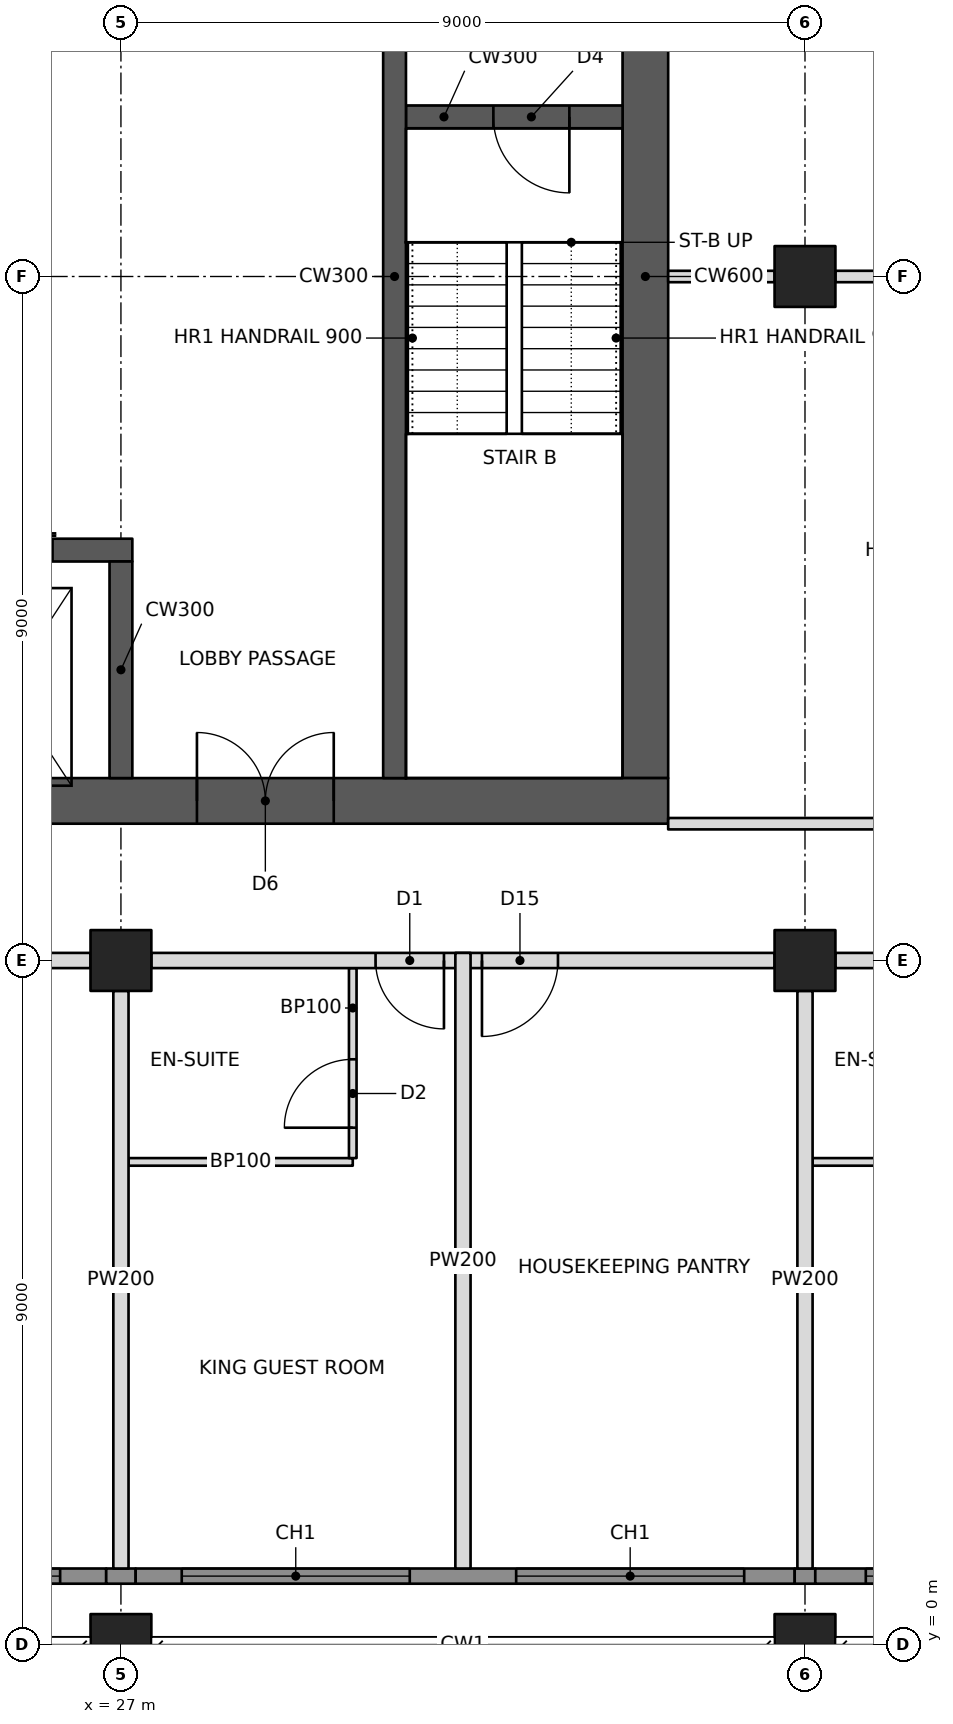
"""IFC4 building model, lengths in metres.
Left out: names, types, materials, properties, quantities, classifications, styles, units other than length and angle.
Written with IfcOpenShell. Run it as: python <this file> out.ifc"""

import sys

from ifc_helpers import new_model, si_unit, direction, frame, frame_2d, origin, origin_2d, place, context, subcontext, project, spatial, rectangle, hollow_rectangle, extrude, element, fill, save


model = new_model("IFC4")
c1 = context("Model", 3, precision=1e-05, world=origin(), true_north=direction((0.0, 1.0)))
c2 = subcontext(c1, "Body", "Model", "MODEL_VIEW")
j1 = project(units=[si_unit("LENGTHUNIT", "METRE"), si_unit("PLANEANGLEUNIT", "RADIAN")], contexts=[c1])
p1 = place(None, origin())
s1 = spatial("IfcSite", under=j1, at=p1, CompositionType="ELEMENT")
p2 = place(p1, origin())
s2 = spatial("IfcBuilding", under=s1, at=p2, CompositionType="ELEMENT")
p3 = place(p2, frame((0.0, 0.0, 28.0)))
s3 = spatial("IfcBuildingStorey", under=s2, at=p3, CompositionType="ELEMENT", Elevation=28.0)
for number, where, z_axis, x_axis in (
    (1, (27.0, 0.0, 0.0), (0.0, 0.0, 1.0), (1.0, 0.0, 0.0)),
    (2, (27.0, 9.0, 0.0), (0.0, 0.0, 1.0), (1.0, 0.0, 0.0)),
    (3, (36.0, 0.0, 0.0), (0.0, 0.0, 1.0), (1.0, 0.0, 0.0)),
    (4, (36.0, 9.0, 0.0), (0.0, 0.0, 1.0), (0.0, 1.0, 0.0)),
    (5, (36.0, 18.0, 0.0), (0.0, 0.0, 1.0), (0.0, 1.0, 0.0)),
):
    element("IfcColumn", number, at=place(p3, frame(where, z_axis=z_axis, x_axis=x_axis)), inside=s3, PredefinedType="COLUMN", context=c2, shape_type="SweptSolid", body=[
        extrude(hollow_rectangle(XDim=0.8, YDim=0.8, WallThickness=0.1, at=origin_2d()), origin(), (0.0, 0.0, 1.0), 3.4),
    ])
p4 = place(p3, frame((10.8, 11.1, 0.0), z_axis=(0.0, 0.0, 1.0), x_axis=(1.0, 0.0, 0.0)))
e6 = element("IfcWall", 6, at=p4, inside=s3, PredefinedType="SHEAR", context=c2, shape_type="SweptSolid", body=[
    extrude(rectangle(XDim=23.4, YDim=0.6, at=frame_2d((11.7, 0.0))), origin(), (0.0, 0.0, 1.0), 3.4),
])
p5 = place(p4, frame((1.0, 0.0, 0.0)))
e7 = element("IfcOpeningElement", 7, at=p5, cuts=e6, PredefinedType="OPENING", context=c2, shape_type="SweptSolid", body=[
    extrude(rectangle(XDim=1.0, YDim=2.1, at=frame_2d((0.5, 1.05))), frame((0.0, 0.31, 0.0), z_axis=(0.0, -1.0, 0.0), x_axis=(1.0, 0.0, 0.0)), (0.0, 0.0, 1.0), 0.62),
])
p6 = place(p4, frame((17.2, 0.0, 0.0)))
e8 = element("IfcOpeningElement", 8, at=p6, cuts=e6, PredefinedType="OPENING", context=c2, shape_type="SweptSolid", body=[
    extrude(rectangle(XDim=1.8, YDim=2.1, at=frame_2d((0.9, 1.05))), frame((0.0, 0.31, 0.0), z_axis=(0.0, -1.0, 0.0), x_axis=(1.0, 0.0, 0.0)), (0.0, 0.0, 1.0), 0.62),
])
p7 = place(p3, frame((33.9, 11.4, 0.0), z_axis=(0.0, 0.0, 1.0), x_axis=(0.0, 1.0, 0.0)))
e9 = element("IfcWall", 9, at=p7, inside=s3, PredefinedType="SHEAR", context=c2, shape_type="SweptSolid", body=[
    extrude(rectangle(XDim=13.2, YDim=0.6, at=frame_2d((6.6, 0.0))), origin(), (0.0, 0.0, 1.0), 3.4),
])
p8 = place(p3, frame((18.15, 14.4, 0.0), z_axis=(0.0, 0.0, 1.0), x_axis=(1.0, 0.0, 0.0)))
e10 = element("IfcWall", 10, at=p8, inside=s3, PredefinedType="SHEAR", context=c2, shape_type="SweptSolid", body=[
    extrude(rectangle(XDim=9.0, YDim=0.3, at=frame_2d((4.5, 0.0))), origin(), (0.0, 0.0, 1.0), 3.4),
])
p9 = place(p8, frame((0.8, 0.0, 0.0)))
e11 = element("IfcOpeningElement", 11, at=p9, cuts=e10, PredefinedType="OPENING", context=c2, shape_type="SweptSolid", body=[
    extrude(rectangle(XDim=1.1, YDim=2.1, at=frame_2d((0.55, 1.05))), frame((0.0, 0.16, 0.0), z_axis=(0.0, -1.0, 0.0), x_axis=(1.0, 0.0, 0.0)), (0.0, 0.0, 1.0), 0.32),
])
p10 = place(p8, frame((3.8, 0.0, 0.0)))
e12 = element("IfcOpeningElement", 12, at=p10, cuts=e10, PredefinedType="OPENING", context=c2, shape_type="SweptSolid", body=[
    extrude(rectangle(XDim=1.1, YDim=2.1, at=frame_2d((0.55, 1.05))), frame((0.0, 0.16, 0.0), z_axis=(0.0, -1.0, 0.0), x_axis=(1.0, 0.0, 0.0)), (0.0, 0.0, 1.0), 0.32),
])
p11 = place(p8, frame((6.75, 0.0, 0.0)))
e13 = element("IfcOpeningElement", 13, at=p11, cuts=e10, PredefinedType="OPENING", context=c2, shape_type="SweptSolid", body=[
    extrude(rectangle(XDim=1.2, YDim=2.1, at=frame_2d((0.6, 1.05))), frame((0.0, 0.16, 0.0), z_axis=(0.0, -1.0, 0.0), x_axis=(1.0, 0.0, 0.0)), (0.0, 0.0, 1.0), 0.32),
])
p12 = place(p3, frame((27.0, 11.4, 0.0), z_axis=(0.0, 0.0, 1.0), x_axis=(0.0, 1.0, 0.0)))
e14 = element("IfcWall", 14, at=p12, inside=s3, PredefinedType="SHEAR", context=c2, shape_type="SweptSolid", body=[
    extrude(rectangle(XDim=2.85, YDim=0.3, at=frame_2d((1.425, 0.0))), origin(), (0.0, 0.0, 1.0), 3.4),
])
p13 = place(p3, frame((30.6, 11.4, 0.0), z_axis=(0.0, 0.0, 1.0), x_axis=(0.0, 1.0, 0.0)))
e15 = element("IfcWall", 15, at=p13, inside=s3, PredefinedType="SHEAR", context=c2, shape_type="SweptSolid", body=[
    extrude(rectangle(XDim=13.2, YDim=0.3, at=frame_2d((6.6, 0.0))), origin(), (0.0, 0.0, 1.0), 3.4),
])
p14 = place(p3, frame((30.75, 20.1, 0.0), z_axis=(0.0, 0.0, 1.0), x_axis=(1.0, 0.0, 0.0)))
e16 = element("IfcWall", 16, at=p14, inside=s3, PredefinedType="SHEAR", context=c2, shape_type="SweptSolid", body=[
    extrude(rectangle(XDim=2.85, YDim=0.3, at=frame_2d((1.425, 0.0))), origin(), (0.0, 0.0, 1.0), 3.4),
])
p15 = place(p14, frame((1.15, 0.0, 0.0)))
e17 = element("IfcOpeningElement", 17, at=p15, cuts=e16, PredefinedType="OPENING", context=c2, shape_type="SweptSolid", body=[
    extrude(rectangle(XDim=1.0, YDim=2.1, at=frame_2d((0.5, 1.05))), frame((0.0, 0.16, 0.0), z_axis=(0.0, -1.0, 0.0), x_axis=(1.0, 0.0, 0.0)), (0.0, 0.0, 1.0), 0.32),
])
p16 = place(p3, frame((27.4, 9.0, 0.0), z_axis=(0.0, 0.0, 1.0), x_axis=(1.0, 0.0, 0.0)))
e18 = element("IfcWall", 18, at=p16, inside=s3, PredefinedType="PARTITIONING", context=c2, shape_type="SweptSolid", body=[
    extrude(rectangle(XDim=8.2, YDim=0.2, at=frame_2d((4.1, 0.0))), origin(), (0.0, 0.0, 1.0), 2.405),
])
p17 = place(p16, frame((2.95, 0.0, 0.0)))
e19 = element("IfcOpeningElement", 19, at=p17, cuts=e18, PredefinedType="OPENING", context=c2, shape_type="SweptSolid", body=[
    extrude(rectangle(XDim=0.9, YDim=2.1, at=frame_2d((0.45, 1.05))), frame((0.0, 0.11, 0.0), z_axis=(0.0, -1.0, 0.0), x_axis=(1.0, 0.0, 0.0)), (0.0, 0.0, 1.0), 0.22),
])
p18 = place(p16, frame((4.35, 0.0, 0.0)))
e20 = element("IfcOpeningElement", 20, at=p18, cuts=e18, PredefinedType="OPENING", context=c2, shape_type="SweptSolid", body=[
    extrude(rectangle(XDim=1.0, YDim=2.1, at=frame_2d((0.5, 1.05))), frame((0.0, 0.11, 0.0), z_axis=(0.0, -1.0, 0.0), x_axis=(1.0, 0.0, 0.0)), (0.0, 0.0, 1.0), 0.22),
])
p19 = place(p3, frame((36.4, 9.0, 0.0), z_axis=(0.0, 0.0, 1.0), x_axis=(1.0, 0.0, 0.0)))
e21 = element("IfcWall", 21, at=p19, inside=s3, PredefinedType="PARTITIONING", context=c2, shape_type="SweptSolid", body=[
    extrude(rectangle(XDim=8.2, YDim=0.2, at=frame_2d((4.1, 0.0))), origin(), (0.0, 0.0, 1.0), 2.438),
])
p20 = place(p19, frame((2.95, 0.0, 0.0)))
e22 = element("IfcOpeningElement", 22, at=p20, cuts=e21, PredefinedType="OPENING", context=c2, shape_type="SweptSolid", body=[
    extrude(rectangle(XDim=0.9, YDim=2.1, at=frame_2d((0.45, 1.05))), frame((0.0, 0.11, 0.0), z_axis=(0.0, -1.0, 0.0), x_axis=(1.0, 0.0, 0.0)), (0.0, 0.0, 1.0), 0.22),
])
p21 = place(p19, frame((4.35, 0.0, 0.0)))
e23 = element("IfcOpeningElement", 23, at=p21, cuts=e21, PredefinedType="OPENING", context=c2, shape_type="SweptSolid", body=[
    extrude(rectangle(XDim=0.9, YDim=2.1, at=frame_2d((0.45, 1.05))), frame((0.0, 0.11, 0.0), z_axis=(0.0, -1.0, 0.0), x_axis=(1.0, 0.0, 0.0)), (0.0, 0.0, 1.0), 0.22),
])
p22 = place(p3, frame((34.2, 10.8, 0.0), z_axis=(0.0, 0.0, 1.0), x_axis=(1.0, 0.0, 0.0)))
e24 = element("IfcWall", 24, at=p22, inside=s3, PredefinedType="PARTITIONING", context=c2, shape_type="SweptSolid", body=[
    extrude(rectangle(XDim=9.075, YDim=0.15, at=frame_2d((4.538, 0.0))), origin(), (0.0, 0.0, 1.0), 2.404),
])
p23 = place(p22, frame((3.0, 0.0, 0.0)))
e25 = element("IfcOpeningElement", 25, at=p23, cuts=e24, PredefinedType="OPENING", context=c2, shape_type="SweptSolid", body=[
    extrude(rectangle(XDim=1.0, YDim=2.1, at=frame_2d((0.5, 1.05))), frame((0.0, 0.085, 0.0), z_axis=(0.0, -1.0, 0.0), x_axis=(1.0, 0.0, 0.0)), (0.0, 0.0, 1.0), 0.17),
])
p24 = place(p3, frame((34.2, 18.0, 0.0), z_axis=(0.0, 0.0, 1.0), x_axis=(1.0, 0.0, 0.0)))
e26 = element("IfcWall", 26, at=p24, inside=s3, PredefinedType="PARTITIONING", context=c2, shape_type="SweptSolid", body=[
    extrude(rectangle(XDim=1.4, YDim=0.15, at=frame_2d((0.7, 0.0))), origin(), (0.0, 0.0, 1.0), 3.2),
])
p25 = place(p3, frame((36.4, 18.0, 0.0), z_axis=(0.0, 0.0, 1.0), x_axis=(1.0, 0.0, 0.0)))
e27 = element("IfcWall", 27, at=p25, inside=s3, PredefinedType="PARTITIONING", context=c2, shape_type="SweptSolid", body=[
    extrude(rectangle(XDim=6.725, YDim=0.15, at=frame_2d((3.363, 0.0))), origin(), (0.0, 0.0, 1.0), 2.405),
])
p26 = place(p3, frame((27.0, 8.6, 0.0), z_axis=(0.0, 0.0, 1.0), x_axis=(0.0, -1.0, 0.0)))
e28 = element("IfcWall", 28, at=p26, inside=s3, PredefinedType="PARTITIONING", context=c2, shape_type="SweptSolid", body=[
    extrude(rectangle(XDim=7.6, YDim=0.2, at=frame_2d((3.8, 0.0))), origin(), (0.0, 0.0, 1.0), 2.405),
])
p27 = place(p3, frame((36.0, 8.6, 0.0), z_axis=(0.0, 0.0, 1.0), x_axis=(0.0, -1.0, 0.0)))
e29 = element("IfcWall", 29, at=p27, inside=s3, PredefinedType="PARTITIONING", context=c2, shape_type="SweptSolid", body=[
    extrude(rectangle(XDim=7.6, YDim=0.2, at=frame_2d((3.8, 0.0))), origin(), (0.0, 0.0, 1.0), 2.438),
])
p28 = place(p3, frame((20.1, 9.0, 0.0), z_axis=(0.0, 0.0, 1.0), x_axis=(1.0, 0.0, 0.0)))
e30 = element("IfcWall", 30, at=p28, inside=s3, PredefinedType="PARTITIONING", context=c2, shape_type="SweptSolid", body=[
    extrude(rectangle(XDim=6.5, YDim=0.2, at=frame_2d((3.25, 0.0))), origin(), (0.0, 0.0, 1.0), 2.405),
])
p29 = place(p3, frame((31.5, 9.1, 0.0), z_axis=(0.0, 0.0, 1.0), x_axis=(0.0, -1.0, 0.0)))
e31 = element("IfcWall", 31, at=p29, inside=s3, PredefinedType="PARTITIONING", context=c2, shape_type="SweptSolid", body=[
    extrude(rectangle(XDim=8.1, YDim=0.2, at=frame_2d((4.05, 0.0))), origin(), (0.0, 0.0, 1.0), 2.404),
])
p30 = place(p3, frame((27.1, 6.35, 0.0), z_axis=(0.0, 0.0, 1.0), x_axis=(1.0, 0.0, 0.0)))
e32 = element("IfcWall", 32, at=p30, inside=s3, PredefinedType="PARTITIONING", context=c2, shape_type="SweptSolid", body=[
    extrude(rectangle(XDim=2.95, YDim=0.1, at=frame_2d((1.475, 0.0))), origin(), (0.0, 0.0, 1.0), 2.404),
])
p31 = place(p3, frame((30.05, 8.9, 0.0), z_axis=(0.0, 0.0, 1.0), x_axis=(0.0, -1.0, 0.0)))
e33 = element("IfcWall", 33, at=p31, inside=s3, PredefinedType="PARTITIONING", context=c2, shape_type="SweptSolid", body=[
    extrude(rectangle(XDim=2.5, YDim=0.1, at=frame_2d((1.25, 0.0))), origin(), (0.0, 0.0, 1.0), 2.404),
])
p32 = place(p31, frame((1.2, 0.0, 0.0)))
e34 = element("IfcOpeningElement", 34, at=p32, cuts=e33, PredefinedType="OPENING", context=c2, shape_type="SweptSolid", body=[
    extrude(rectangle(XDim=0.9, YDim=2.1, at=frame_2d((0.45, 1.05))), frame((0.0, 0.06, 0.0), z_axis=(0.0, -1.0, 0.0), x_axis=(1.0, 0.0, 0.0)), (0.0, 0.0, 1.0), 0.12),
])
p33 = place(p3, frame((36.1, 6.35, 0.0), z_axis=(0.0, 0.0, 1.0), x_axis=(1.0, 0.0, 0.0)))
e35 = element("IfcWall", 35, at=p33, inside=s3, PredefinedType="PARTITIONING", context=c2, shape_type="SweptSolid", body=[
    extrude(rectangle(XDim=2.95, YDim=0.1, at=frame_2d((1.475, 0.0))), origin(), (0.0, 0.0, 1.0), 2.438),
])
p34 = place(p3, frame((18.194, 0.9, 0.0), z_axis=(0.0, 0.0, 1.0), x_axis=(1.0, 0.0, 0.0)))
e36 = element("IfcWall", 36, at=p34, inside=s3, PredefinedType="SOLIDWALL", context=c2, shape_type="SweptSolid", body=[
    extrude(rectangle(XDim=8.612, YDim=0.2, at=frame_2d((4.306, 0.0))), origin(), (0.0, 0.0, 1.0), 3.2),
])
p35 = place(p34, frame((0.606, 0.0, 0.6)))
e37 = element("IfcOpeningElement", 37, at=p35, cuts=e36, PredefinedType="OPENING", context=c2, shape_type="SweptSolid", body=[
    extrude(rectangle(XDim=3.0, YDim=2.2, at=frame_2d((1.5, 1.1))), frame((0.0, 0.11, 0.0), z_axis=(0.0, -1.0, 0.0), x_axis=(1.0, 0.0, 0.0)), (0.0, 0.0, 1.0), 0.22),
])
p36 = place(p34, frame((5.006, 0.0, 0.6)))
e38 = element("IfcOpeningElement", 38, at=p36, cuts=e36, PredefinedType="OPENING", context=c2, shape_type="SweptSolid", body=[
    extrude(rectangle(XDim=3.0, YDim=2.2, at=frame_2d((1.5, 1.1))), frame((0.0, 0.11, 0.0), z_axis=(0.0, -1.0, 0.0), x_axis=(1.0, 0.0, 0.0)), (0.0, 0.0, 1.0), 0.22),
])
p37 = place(p3, frame((26.806, 0.9, 0.0), z_axis=(0.0, 0.0, 1.0), x_axis=(1.0, 0.0, 0.0)))
e39 = element("IfcWall", 39, at=p37, inside=s3, PredefinedType="SOLIDWALL", context=c2, shape_type="SweptSolid", body=[
    extrude(rectangle(XDim=0.388, YDim=0.2, at=frame_2d((0.194, 0.0))), origin(), (0.0, 0.0, 1.0), 2.404),
])
p38 = place(p3, frame((27.194, 0.9, 0.0), z_axis=(0.0, 0.0, 1.0), x_axis=(1.0, 0.0, 0.0)))
e40 = element("IfcWall", 40, at=p38, inside=s3, PredefinedType="SOLIDWALL", context=c2, shape_type="SweptSolid", body=[
    extrude(rectangle(XDim=8.671, YDim=0.2, at=frame_2d((4.335, 0.0))), origin(), (0.0, 0.0, 1.0), 3.2),
])
p39 = place(p38, frame((0.606, 0.0, 0.6)))
e41 = element("IfcOpeningElement", 41, at=p39, cuts=e40, PredefinedType="OPENING", context=c2, shape_type="SweptSolid", body=[
    extrude(rectangle(XDim=3.0, YDim=2.2, at=frame_2d((1.5, 1.1))), frame((0.0, 0.11, 0.0), z_axis=(0.0, -1.0, 0.0), x_axis=(1.0, 0.0, 0.0)), (0.0, 0.0, 1.0), 0.22),
])
p40 = place(p38, frame((5.006, 0.0, 0.6)))
e42 = element("IfcOpeningElement", 42, at=p40, cuts=e40, PredefinedType="OPENING", context=c2, shape_type="SweptSolid", body=[
    extrude(rectangle(XDim=3.0, YDim=2.2, at=frame_2d((1.5, 1.1))), frame((0.0, 0.11, 0.0), z_axis=(0.0, -1.0, 0.0), x_axis=(1.0, 0.0, 0.0)), (0.0, 0.0, 1.0), 0.22),
])
p41 = place(p3, frame((35.865, 0.9, 0.0), z_axis=(0.0, 0.0, 1.0), x_axis=(1.0, 0.0, 0.0)))
e43 = element("IfcWall", 43, at=p41, inside=s3, PredefinedType="SOLIDWALL", context=c2, shape_type="SweptSolid", body=[
    extrude(rectangle(XDim=0.271, YDim=0.2, at=frame_2d((0.135, 0.0))), origin(), (0.0, 0.0, 1.0), 2.438),
])
p42 = place(p3, frame((36.135, 0.9, 0.0), z_axis=(0.0, 0.0, 1.0), x_axis=(1.0, 0.0, 0.0)))
e44 = element("IfcWall", 44, at=p42, inside=s3, PredefinedType="SOLIDWALL", context=c2, shape_type="SweptSolid", body=[
    extrude(rectangle(XDim=8.729, YDim=0.2, at=frame_2d((4.365, 0.0))), origin(), (0.0, 0.0, 1.0), 3.2),
])
p43 = place(p42, frame((0.665, 0.0, 0.6)))
e45 = element("IfcOpeningElement", 45, at=p43, cuts=e44, PredefinedType="OPENING", context=c2, shape_type="SweptSolid", body=[
    extrude(rectangle(XDim=3.0, YDim=2.2, at=frame_2d((1.5, 1.1))), frame((0.0, 0.11, 0.0), z_axis=(0.0, -1.0, 0.0), x_axis=(1.0, 0.0, 0.0)), (0.0, 0.0, 1.0), 0.22),
])
p44 = place(p42, frame((5.065, 0.0, 0.6)))
e46 = element("IfcOpeningElement", 46, at=p44, cuts=e44, PredefinedType="OPENING", context=c2, shape_type="SweptSolid", body=[
    extrude(rectangle(XDim=3.0, YDim=2.2, at=frame_2d((1.5, 1.1))), frame((0.0, 0.11, 0.0), z_axis=(0.0, -1.0, 0.0), x_axis=(1.0, 0.0, 0.0)), (0.0, 0.0, 1.0), 0.22),
])
p45 = place(p36, origin())
e47 = element("IfcWindow", 47, at=p45, inside=s3, PartitioningType="TRIPLE_PANEL_VERTICAL", PredefinedType="WINDOW", context=c2, shape_type="SweptSolid", body=[
    extrude(rectangle(XDim=3.0, YDim=2.2, at=frame_2d((1.5, 1.1))), frame((0.0, 0.03, 0.0), z_axis=(0.0, -1.0, 0.0), x_axis=(1.0, 0.0, 0.0)), (0.0, 0.0, 1.0), 0.06),
])
fill(e38, e47)
p46 = place(p39, origin())
e48 = element("IfcWindow", 48, at=p46, inside=s3, PartitioningType="TRIPLE_PANEL_VERTICAL", PredefinedType="WINDOW", context=c2, shape_type="SweptSolid", body=[
    extrude(rectangle(XDim=3.0, YDim=2.2, at=frame_2d((1.5, 1.1))), frame((0.0, 0.03, 0.0), z_axis=(0.0, -1.0, 0.0), x_axis=(1.0, 0.0, 0.0)), (0.0, 0.0, 1.0), 0.06),
])
fill(e41, e48)
p47 = place(p40, origin())
e49 = element("IfcWindow", 49, at=p47, inside=s3, PartitioningType="TRIPLE_PANEL_VERTICAL", PredefinedType="WINDOW", context=c2, shape_type="SweptSolid", body=[
    extrude(rectangle(XDim=3.0, YDim=2.2, at=frame_2d((1.5, 1.1))), frame((0.0, 0.03, 0.0), z_axis=(0.0, -1.0, 0.0), x_axis=(1.0, 0.0, 0.0)), (0.0, 0.0, 1.0), 0.06),
])
fill(e42, e49)
p48 = place(p43, origin())
e50 = element("IfcWindow", 50, at=p48, inside=s3, PartitioningType="TRIPLE_PANEL_VERTICAL", PredefinedType="WINDOW", context=c2, shape_type="SweptSolid", body=[
    extrude(rectangle(XDim=3.0, YDim=2.2, at=frame_2d((1.5, 1.1))), frame((0.0, 0.03, 0.0), z_axis=(0.0, -1.0, 0.0), x_axis=(1.0, 0.0, 0.0)), (0.0, 0.0, 1.0), 0.06),
])
fill(e45, e50)
p49 = place(p32, frame((0.9, 0.0, 0.0), z_axis=(0.0, 0.0, 1.0), x_axis=(-1.0, 0.0, 0.0)))
e51 = element("IfcDoor", 51, at=p49, inside=s3, OperationType="SINGLE_SWING_LEFT", PredefinedType="DOOR", context=c2, shape_type="SweptSolid", body=[
    extrude(rectangle(XDim=0.9, YDim=2.1, at=frame_2d((0.45, 1.05))), frame((0.0, 0.025, 0.0), z_axis=(0.0, -1.0, 0.0), x_axis=(1.0, 0.0, 0.0)), (0.0, 0.0, 1.0), 0.05),
])
fill(e34, e51)
p50 = place(p17, frame((0.9, 0.0, 0.0), z_axis=(0.0, 0.0, 1.0), x_axis=(-1.0, 0.0, 0.0)))
e52 = element("IfcDoor", 52, at=p50, inside=s3, OperationType="SINGLE_SWING_LEFT", PredefinedType="DOOR", context=c2, shape_type="SweptSolid", body=[
    extrude(rectangle(XDim=0.9, YDim=2.1, at=frame_2d((0.45, 1.05))), frame((0.0, 0.025, 0.0), z_axis=(0.0, -1.0, 0.0), x_axis=(1.0, 0.0, 0.0)), (0.0, 0.0, 1.0), 0.05),
])
fill(e19, e52)
p51 = place(p18, frame((1.0, 0.0, 0.0), z_axis=(0.0, 0.0, 1.0), x_axis=(-1.0, 0.0, 0.0)))
e53 = element("IfcDoor", 53, at=p51, inside=s3, OperationType="SINGLE_SWING_RIGHT", PredefinedType="DOOR", context=c2, shape_type="SweptSolid", body=[
    extrude(rectangle(XDim=1.0, YDim=2.1, at=frame_2d((0.5, 1.05))), frame((0.0, 0.025, 0.0), z_axis=(0.0, -1.0, 0.0), x_axis=(1.0, 0.0, 0.0)), (0.0, 0.0, 1.0), 0.05),
])
fill(e20, e53)
p52 = place(p6, origin())
e54 = element("IfcDoor", 54, at=p52, inside=s3, OperationType="DOUBLE_DOOR_SINGLE_SWING", PredefinedType="DOOR", context=c2, shape_type="SweptSolid", body=[
    extrude(rectangle(XDim=1.8, YDim=2.1, at=frame_2d((0.9, 1.05))), frame((0.0, 0.025, 0.0), z_axis=(0.0, -1.0, 0.0), x_axis=(1.0, 0.0, 0.0)), (0.0, 0.0, 1.0), 0.05),
])
fill(e8, e54)
p53 = place(p15, frame((1.0, 0.0, 0.0), z_axis=(0.0, 0.0, 1.0), x_axis=(-1.0, 0.0, 0.0)))
e55 = element("IfcDoor", 55, at=p53, inside=s3, OperationType="SINGLE_SWING_LEFT", PredefinedType="DOOR", context=c2, shape_type="SweptSolid", body=[
    extrude(rectangle(XDim=1.0, YDim=2.1, at=frame_2d((0.5, 1.05))), frame((0.0, 0.025, 0.0), z_axis=(0.0, -1.0, 0.0), x_axis=(1.0, 0.0, 0.0)), (0.0, 0.0, 1.0), 0.05),
])
fill(e17, e55)
save(model, sys.argv[1])
